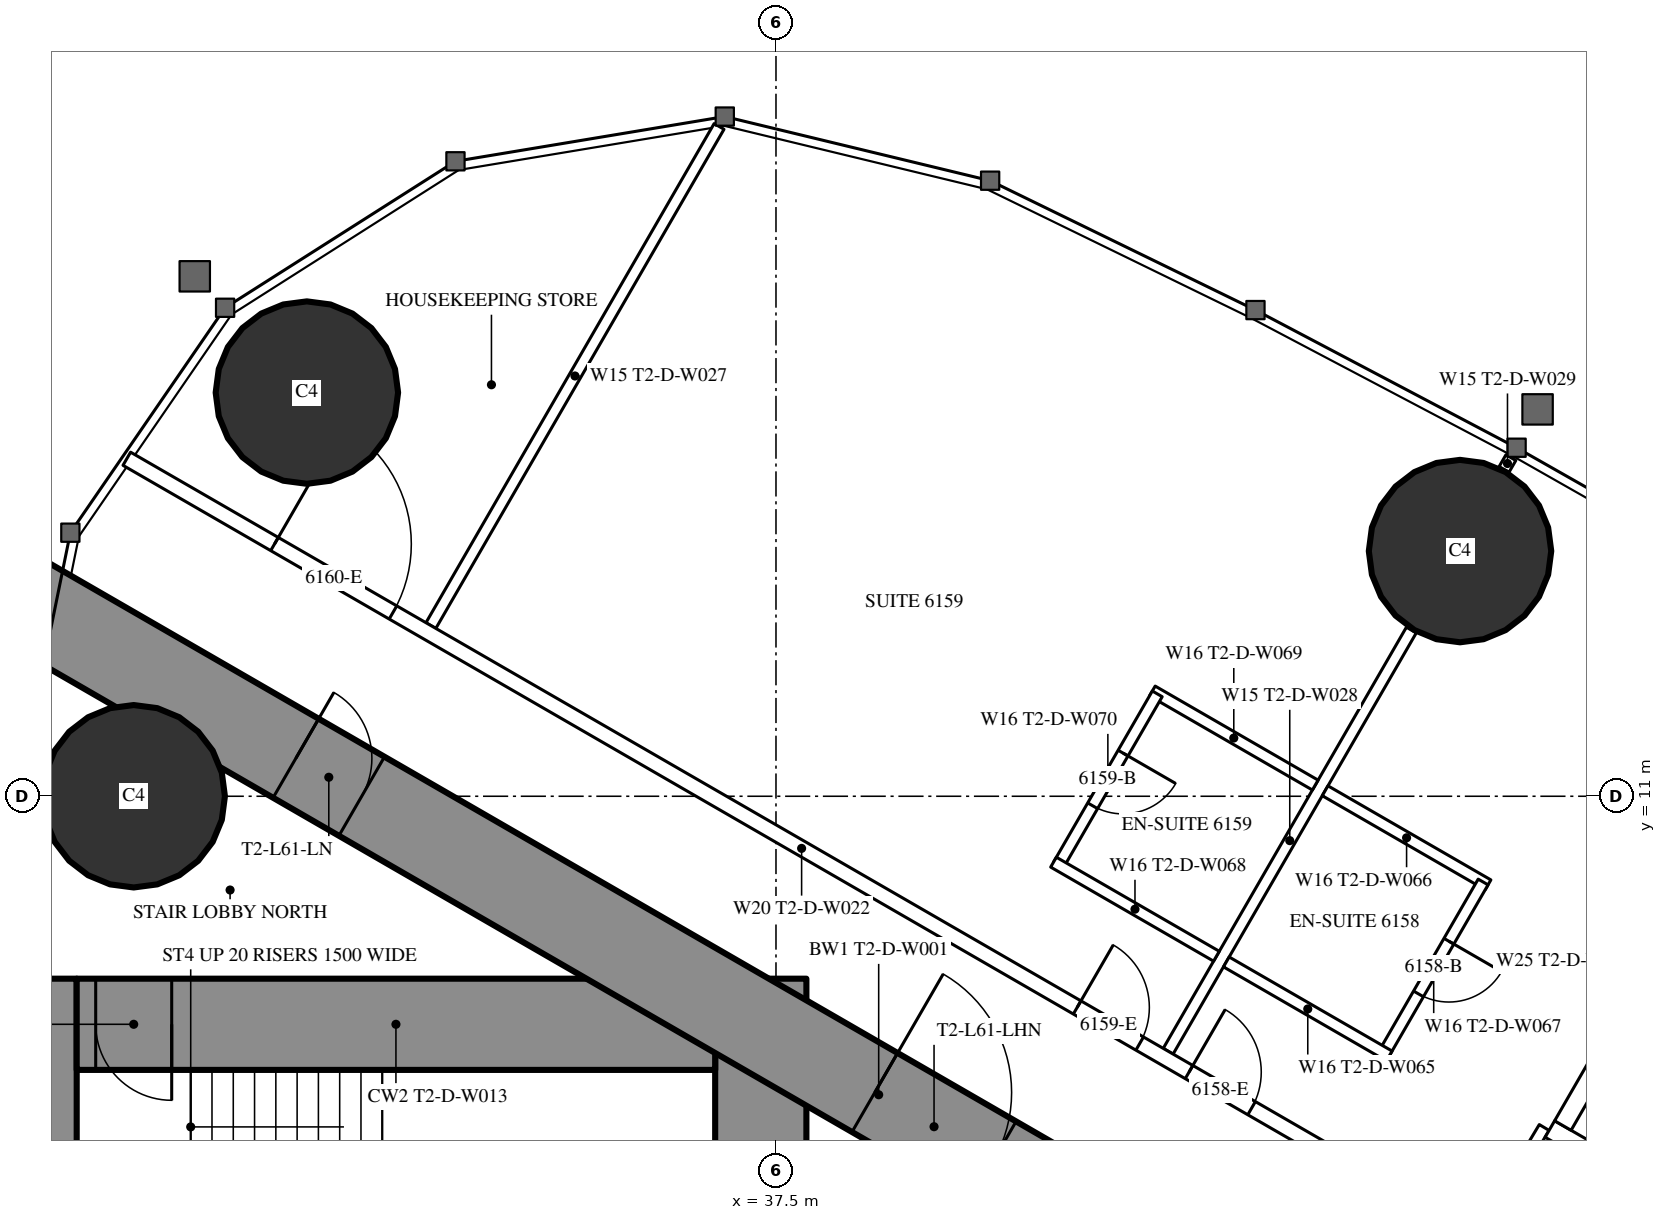
"""IFC4 building model, lengths in metres.
Left out: names, types, materials, properties, quantities, classifications, styles, units other than length and angle.
Written with IfcOpenShell. Run it as: python <this file> out.ifc"""

import sys

from ifc_helpers import new_model, si_unit, direction, frame, frame_2d, origin, origin_2d, place, context, subcontext, project, spatial, rectangle, circle, extrude, element, fill, save


model = new_model("IFC4")
c1 = context("Model", 3, precision=1e-05, world=origin(), true_north=direction((0.0, 1.0)))
c2 = subcontext(c1, "Body", "Model", "MODEL_VIEW")
j1 = project(units=[si_unit("LENGTHUNIT", "METRE"), si_unit("PLANEANGLEUNIT", "RADIAN")], contexts=[c1])
p1 = place(None, origin())
s1 = spatial("IfcSite", under=j1, at=p1, CompositionType="ELEMENT")
p2 = place(p1, origin())
s2 = spatial("IfcBuilding", under=s1, at=p2, CompositionType="ELEMENT")
p3 = place(p2, frame((0.0, 0.0, 229.7)))
s3 = spatial("IfcBuildingStorey", under=s2, at=p3, CompositionType="ELEMENT", Elevation=229.7)
for number, where, z_axis, x_axis in (
    (1, (31.328, 16.311, 0.0), (0.0, 0.0, 1.0), (1.0, 0.0, 0.0)),
    (2, (29.05, 11.0, 0.0), (0.0, 0.0, 1.0), (1.0, 0.0, 0.0)),
    (3, (46.499, 14.226, 0.0), (0.0, 0.0, 1.0), (1.0, 0.0, 0.0)),
):
    element("IfcColumn", number, at=place(p3, frame(where, z_axis=z_axis, x_axis=x_axis)), inside=s3, PredefinedType="COLUMN", context=c2, shape_type="SweptSolid", body=[
        extrude(circle(Radius=1.2, at=origin_2d()), origin(), (0.0, 0.0, 1.0), 3.6),
    ])
p4 = place(p3, frame((27.9, -8.6, 0.0), z_axis=(0.0, 0.0, 1.0), x_axis=(0.0, 1.0, 0.0)))
e4 = element("IfcWall", 4, at=p4, inside=s3, PredefinedType="SHEAR", context=c2, shape_type="SweptSolid", body=[
    extrude(rectangle(XDim=17.2, YDim=0.8, at=frame_2d((8.6, 0.0))), origin(), (0.0, 0.0, 1.0), 3.6),
])
p5 = place(p4, frame((9.35, 0.0, 0.0)))
e5 = element("IfcOpeningElement", 5, at=p5, cuts=e4, PredefinedType="OPENING", context=c2, shape_type="SweptSolid", body=[
    extrude(rectangle(XDim=0.9, YDim=2.2, at=frame_2d((0.45, 1.1))), frame((0.0, 0.41, 0.0), z_axis=(0.0, -1.0, 0.0), x_axis=(1.0, 0.0, 0.0)), (0.0, 0.0, 1.0), 0.82),
])
p6 = place(p3, frame((37.3, -8.6, 0.0), z_axis=(0.0, 0.0, 1.0), x_axis=(0.0, 1.0, 0.0)))
e6 = element("IfcWall", 6, at=p6, inside=s3, PredefinedType="SHEAR", context=c2, shape_type="SweptSolid", body=[
    extrude(rectangle(XDim=17.2, YDim=1.2, at=frame_2d((8.6, 0.0))), origin(), (0.0, 0.0, 1.0), 3.6),
])
p7 = place(p6, frame((7.7, 0.0, 0.0)))
e7 = element("IfcOpeningElement", 7, at=p7, cuts=e6, PredefinedType="OPENING", context=c2, shape_type="SweptSolid", body=[
    extrude(rectangle(XDim=1.8, YDim=2.2, at=frame_2d((0.9, 1.1))), frame((0.0, 0.61, 0.0), z_axis=(0.0, -1.0, 0.0), x_axis=(1.0, 0.0, 0.0)), (0.0, 0.0, 1.0), 1.22),
])
p8 = place(p3, frame((28.3, 8.0, 0.0), z_axis=(0.0, 0.0, 1.0), x_axis=(1.0, 0.0, 0.0)))
e8 = element("IfcWall", 8, at=p8, inside=s3, PredefinedType="SHEAR", context=c2, shape_type="SweptSolid", body=[
    extrude(rectangle(XDim=8.4, YDim=1.2, at=frame_2d((4.2, 0.0))), origin(), (0.0, 0.0, 1.0), 3.6),
])
p9 = place(p8, frame((0.25, 0.0, 0.0)))
e9 = element("IfcOpeningElement", 9, at=p9, cuts=e8, PredefinedType="OPENING", context=c2, shape_type="SweptSolid", body=[
    extrude(rectangle(XDim=1.0, YDim=2.2, at=frame_2d((0.5, 1.1))), frame((0.0, 0.61, 0.0), z_axis=(0.0, -1.0, 0.0), x_axis=(1.0, 0.0, 0.0)), (0.0, 0.0, 1.0), 1.22),
])
p10 = place(p3, frame((27.2, 13.8, 0.0), z_axis=(0.0, 0.0, 1.0), x_axis=(0.866024515034, -0.500001539357, 0.0)))
e10 = element("IfcWall", 10, at=p10, inside=s3, PredefinedType="SHEAR", context=c2, shape_type="SweptSolid", body=[
    extrude(rectangle(XDim=26.907, YDim=1.2, at=frame_2d((13.454, 0.0))), origin(), (0.0, 0.0, 1.0), 3.6),
])
p11 = place(p10, frame((4.6, 0.0, 0.0)))
e11 = element("IfcOpeningElement", 11, at=p11, cuts=e10, PredefinedType="OPENING", context=c2, shape_type="SweptSolid", body=[
    extrude(rectangle(XDim=1.0, YDim=2.2, at=frame_2d((0.5, 1.1))), frame((0.0, 0.61, 0.0), z_axis=(0.0, -1.0, 0.0), x_axis=(1.0, 0.0, 0.0)), (0.0, 0.0, 1.0), 1.22),
])
p12 = place(p10, frame((13.395, 0.0, 0.0)))
e12 = element("IfcOpeningElement", 12, at=p12, cuts=e10, PredefinedType="OPENING", context=c2, shape_type="SweptSolid", body=[
    extrude(rectangle(XDim=1.8, YDim=2.2, at=frame_2d((0.9, 1.1))), frame((0.0, 0.61, 0.0), z_axis=(0.0, -1.0, 0.0), x_axis=(1.0, 0.0, 0.0)), (0.0, 0.0, 1.0), 1.22),
])
p13 = place(p3, frame((32.96, 13.246, 0.0), z_axis=(0.0, 0.0, 1.0), x_axis=(0.500000236886, 0.866025267018, 0.0)))
e13 = element("IfcWall", 13, at=p13, inside=s3, PredefinedType="PARTITIONING", context=c2, shape_type="SweptSolid", body=[
    extrude(rectangle(XDim=7.583, YDim=0.15, at=frame_2d((3.791, 0.0))), origin(), (0.0, 0.0, 1.0), 3.35),
])
p14 = place(p3, frame((42.66, 7.646, 0.0), z_axis=(0.0, 0.0, 1.0), x_axis=(0.499996592859, 0.866027370889, 0.0)))
e14 = element("IfcWall", 14, at=p14, inside=s3, PredefinedType="PARTITIONING", context=c2, shape_type="SweptSolid", body=[
    extrude(rectangle(XDim=6.398, YDim=0.15, at=frame_2d((3.199, 0.0))), origin(), (0.0, 0.0, 1.0), 2.45),
])
p15 = place(p3, frame((47.079, 15.3, 0.0), z_axis=(0.0, 0.0, 1.0), x_axis=(0.499212083968, 0.866479829667, 0.0)))
e15 = element("IfcWall", 15, at=p15, inside=s3, PredefinedType="PARTITIONING", context=c2, shape_type="SweptSolid", body=[
    extrude(rectangle(XDim=0.179, YDim=0.15, at=frame_2d((0.09, 0.0))), origin(), (0.0, 0.0, 1.0), 2.45),
])
p16 = place(p3, frame((28.959, 15.44, 0.0), z_axis=(0.0, 0.0, 1.0), x_axis=(0.866028936079, -0.499993881836, 0.0)))
e16 = element("IfcWall", 16, at=p16, inside=s3, PredefinedType="PARTITIONING", context=c2, shape_type="SweptSolid", body=[
    extrude(rectangle(XDim=20.503, YDim=0.2, at=frame_2d((10.251, 0.0))), origin(), (0.0, 0.0, 1.0), 3.35),
])
p17 = place(p16, frame((16.137, 0.0, 0.0)))
e17 = element("IfcOpeningElement", 17, at=p17, cuts=e16, PredefinedType="OPENING", context=c2, shape_type="SweptSolid", body=[
    extrude(rectangle(XDim=0.95, YDim=2.2, at=frame_2d((0.475, 1.1))), frame((0.0, 0.11, 0.0), z_axis=(0.0, -1.0, 0.0), x_axis=(1.0, 0.0, 0.0)), (0.0, 0.0, 1.0), 0.22),
])
p18 = place(p16, frame((14.437, 0.0, 0.0)))
e18 = element("IfcOpeningElement", 18, at=p18, cuts=e16, PredefinedType="OPENING", context=c2, shape_type="SweptSolid", body=[
    extrude(rectangle(XDim=0.95, YDim=2.2, at=frame_2d((0.475, 1.1))), frame((0.0, 0.11, 0.0), z_axis=(0.0, -1.0, 0.0), x_axis=(1.0, 0.0, 0.0)), (0.0, 0.0, 1.0), 0.22),
])
p19 = place(p16, frame((2.244, 0.0, 0.0)))
e19 = element("IfcOpeningElement", 19, at=p19, cuts=e16, PredefinedType="OPENING", context=c2, shape_type="SweptSolid", body=[
    extrude(rectangle(XDim=1.8, YDim=2.04, at=frame_2d((0.9, 1.02))), frame((0.0, 0.11, 0.0), z_axis=(0.0, -1.0, 0.0), x_axis=(1.0, 0.0, 0.0)), (0.0, 0.0, 1.0), 0.22),
])
p20 = place(p3, frame((47.606, 6.642, 0.0), z_axis=(0.0, 0.0, 1.0), x_axis=(-0.51353662755, -0.858067673418, 0.0)))
e20 = element("IfcWall", 20, at=p20, inside=s3, PredefinedType="PARTITIONING", context=c2, shape_type="SweptSolid", body=[
    extrude(rectangle(XDim=1.91, YDim=0.15, at=frame_2d((0.955, 0.0))), origin(), (0.0, 0.0, 1.0), 3.35),
])
p21 = place(p3, frame((44.725, 11.072, 0.0), z_axis=(0.0, 0.0, 1.0), x_axis=(0.866006523861, -0.500032699561, 0.0)))
e21 = element("IfcWall", 21, at=p21, inside=s3, PredefinedType="PARTITIONING", context=c2, shape_type="SweptSolid", body=[
    extrude(rectangle(XDim=2.475, YDim=0.15, at=frame_2d((1.237, 0.0))), origin(), (0.0, 0.0, 1.0), 3.35),
])
p22 = place(p3, frame((45.503, 7.621, 0.0), z_axis=(0.0, 0.0, 1.0), x_axis=(0.500006934395, 0.866021400173, 0.0)))
e22 = element("IfcWall", 22, at=p22, inside=s3, PredefinedType="PARTITIONING", context=c2, shape_type="SweptSolid", body=[
    extrude(rectangle(XDim=2.6, YDim=0.15, at=frame_2d((1.3, 0.0))), origin(), (0.0, 0.0, 1.0), 3.35),
])
p23 = place(p22, frame((0.9, 0.0, 0.0)))
e23 = element("IfcOpeningElement", 23, at=p23, cuts=e22, PredefinedType="OPENING", context=c2, shape_type="SweptSolid", body=[
    extrude(rectangle(XDim=0.8, YDim=2.2, at=frame_2d((0.4, 1.1))), frame((0.0, 0.085, 0.0), z_axis=(0.0, -1.0, 0.0), x_axis=(1.0, 0.0, 0.0)), (0.0, 0.0, 1.0), 0.17),
])
p24 = place(p3, frame((43.425, 8.821, 0.0), z_axis=(0.0, 0.0, 1.0), x_axis=(0.866006523861, -0.500032699561, 0.0)))
e24 = element("IfcWall", 24, at=p24, inside=s3, PredefinedType="PARTITIONING", context=c2, shape_type="SweptSolid", body=[
    extrude(rectangle(XDim=2.475, YDim=0.15, at=frame_2d((1.237, 0.0))), origin(), (0.0, 0.0, 1.0), 2.5),
])
p25 = place(p3, frame((42.451, 12.385, 0.0), z_axis=(0.0, 0.0, 1.0), x_axis=(0.866031185235, -0.4999899861, 0.0)))
e25 = element("IfcWall", 25, at=p25, inside=s3, PredefinedType="PARTITIONING", context=c2, shape_type="SweptSolid", body=[
    extrude(rectangle(XDim=2.475, YDim=0.15, at=frame_2d((1.238, 0.0))), origin(), (0.0, 0.0, 1.0), 3.35),
])
p26 = place(p3, frame((41.216, 10.095, 0.0), z_axis=(0.0, 0.0, 1.0), x_axis=(0.499936506574, 0.866062058628, 0.0)))
e26 = element("IfcWall", 26, at=p26, inside=s3, PredefinedType="PARTITIONING", context=c2, shape_type="SweptSolid", body=[
    extrude(rectangle(XDim=2.6, YDim=0.15, at=frame_2d((1.3, 0.0))), origin(), (0.0, 0.0, 1.0), 3.35),
])
p27 = place(p26, frame((0.9, 0.0, 0.0)))
e27 = element("IfcOpeningElement", 27, at=p27, cuts=e26, PredefinedType="OPENING", context=c2, shape_type="SweptSolid", body=[
    extrude(rectangle(XDim=0.8, YDim=2.2, at=frame_2d((0.4, 1.1))), frame((0.0, 0.085, 0.0), z_axis=(0.0, -1.0, 0.0), x_axis=(1.0, 0.0, 0.0)), (0.0, 0.0, 1.0), 0.17),
])
p28 = place(p3, frame((41.151, 10.133, 0.0), z_axis=(0.0, 0.0, 1.0), x_axis=(0.866006523861, -0.500032699561, 0.0)))
e28 = element("IfcWall", 28, at=p28, inside=s3, PredefinedType="PARTITIONING", context=c2, shape_type="SweptSolid", body=[
    extrude(rectangle(XDim=2.475, YDim=0.15, at=frame_2d((1.237, 0.0))), origin(), (0.0, 0.0, 1.0), 2.5),
])
p29 = place(p3, frame((47.681, 6.622, 0.0), z_axis=(0.0, 0.0, 1.0), x_axis=(0.86603344179, -0.499986077507, 0.0)))
e29 = element("IfcWall", 29, at=p29, inside=s3, PredefinedType="PARTITIONING", context=c2, shape_type="SweptSolid", body=[
    extrude(rectangle(XDim=6.6, YDim=0.25, at=frame_2d((3.3, 0.0))), origin(), (0.0, 0.0, 1.0), 3.35),
])
p30 = place(p29, frame((0.75, 0.0, 0.0)))
e30 = element("IfcOpeningElement", 30, at=p30, cuts=e29, PredefinedType="OPENING", context=c2, shape_type="SweptSolid", body=[
    extrude(rectangle(XDim=1.1, YDim=2.2, at=frame_2d((0.55, 1.1))), frame((0.0, 0.135, 0.0), z_axis=(0.0, -1.0, 0.0), x_axis=(1.0, 0.0, 0.0)), (0.0, 0.0, 1.0), 0.27),
])
p31 = place(p29, frame((2.75, 0.0, 0.0)))
e31 = element("IfcOpeningElement", 31, at=p31, cuts=e29, PredefinedType="OPENING", context=c2, shape_type="SweptSolid", body=[
    extrude(rectangle(XDim=1.1, YDim=2.2, at=frame_2d((0.55, 1.1))), frame((0.0, 0.135, 0.0), z_axis=(0.0, -1.0, 0.0), x_axis=(1.0, 0.0, 0.0)), (0.0, 0.0, 1.0), 0.27),
])
p32 = place(p29, frame((4.75, 0.0, 0.0)))
e32 = element("IfcOpeningElement", 32, at=p32, cuts=e29, PredefinedType="OPENING", context=c2, shape_type="SweptSolid", body=[
    extrude(rectangle(XDim=1.1, YDim=2.2, at=frame_2d((0.55, 1.1))), frame((0.0, 0.135, 0.0), z_axis=(0.0, -1.0, 0.0), x_axis=(1.0, 0.0, 0.0)), (0.0, 0.0, 1.0), 0.27),
])
p33 = place(p3, frame((47.852, 6.668, 0.0), z_axis=(0.0, 0.0, 1.0), x_axis=(0.499929347863, 0.866066190972, 0.0)))
e33 = element("IfcWall", 33, at=p33, inside=s3, PredefinedType="PARTITIONING", context=c2, shape_type="SweptSolid", body=[
    extrude(rectangle(XDim=3.201, YDim=0.25, at=frame_2d((1.6, 0.0))), origin(), (0.0, 0.0, 1.0), 3.35),
])
p34 = place(p23, origin())
e34 = element("IfcDoor", 34, at=p34, inside=s3, OperationType="SINGLE_SWING_RIGHT", PredefinedType="DOOR", context=c2, shape_type="SweptSolid", body=[
    extrude(rectangle(XDim=0.8, YDim=2.2, at=frame_2d((0.4, 1.1))), frame((0.0, 0.025, 0.0), z_axis=(0.0, -1.0, 0.0), x_axis=(1.0, 0.0, 0.0)), (0.0, 0.0, 1.0), 0.05),
])
fill(e23, e34)
p35 = place(p17, origin())
e35 = element("IfcDoor", 35, at=p35, inside=s3, OperationType="SINGLE_SWING_LEFT", PredefinedType="DOOR", context=c2, shape_type="SweptSolid", body=[
    extrude(rectangle(XDim=0.95, YDim=2.2, at=frame_2d((0.475, 1.1))), frame((0.0, 0.025, 0.0), z_axis=(0.0, -1.0, 0.0), x_axis=(1.0, 0.0, 0.0)), (0.0, 0.0, 1.0), 0.05),
])
fill(e17, e35)
p36 = place(p27, origin())
e36 = element("IfcDoor", 36, at=p36, inside=s3, OperationType="SINGLE_SWING_RIGHT", PredefinedType="DOOR", context=c2, shape_type="SweptSolid", body=[
    extrude(rectangle(XDim=0.8, YDim=2.2, at=frame_2d((0.4, 1.1))), frame((0.0, 0.025, 0.0), z_axis=(0.0, -1.0, 0.0), x_axis=(1.0, 0.0, 0.0)), (0.0, 0.0, 1.0), 0.05),
])
fill(e27, e36)
p37 = place(p18, origin())
e37 = element("IfcDoor", 37, at=p37, inside=s3, OperationType="SINGLE_SWING_LEFT", PredefinedType="DOOR", context=c2, shape_type="SweptSolid", body=[
    extrude(rectangle(XDim=0.95, YDim=2.2, at=frame_2d((0.475, 1.1))), frame((0.0, 0.025, 0.0), z_axis=(0.0, -1.0, 0.0), x_axis=(1.0, 0.0, 0.0)), (0.0, 0.0, 1.0), 0.05),
])
fill(e18, e37)
p38 = place(p19, origin())
e38 = element("IfcDoor", 38, at=p38, inside=s3, OperationType="DOUBLE_DOOR_SINGLE_SWING", PredefinedType="DOOR", context=c2, shape_type="SweptSolid", body=[
    extrude(rectangle(XDim=1.8, YDim=2.04, at=frame_2d((0.9, 1.02))), frame((0.0, 0.025, 0.0), z_axis=(0.0, -1.0, 0.0), x_axis=(1.0, 0.0, 0.0)), (0.0, 0.0, 1.0), 0.05),
])
fill(e19, e38)
p39 = place(p11, origin())
e39 = element("IfcDoor", 39, at=p39, inside=s3, OperationType="SINGLE_SWING_LEFT", PredefinedType="DOOR", context=c2, shape_type="SweptSolid", body=[
    extrude(rectangle(XDim=1.0, YDim=2.2, at=frame_2d((0.5, 1.1))), frame((0.0, 0.025, 0.0), z_axis=(0.0, -1.0, 0.0), x_axis=(1.0, 0.0, 0.0)), (0.0, 0.0, 1.0), 0.05),
])
fill(e11, e39)
p40 = place(p12, origin())
e40 = element("IfcDoor", 40, at=p40, inside=s3, OperationType="DOUBLE_DOOR_SINGLE_SWING", PredefinedType="DOOR", context=c2, shape_type="SweptSolid", body=[
    extrude(rectangle(XDim=1.8, YDim=2.2, at=frame_2d((0.9, 1.1))), frame((0.0, 0.025, 0.0), z_axis=(0.0, -1.0, 0.0), x_axis=(1.0, 0.0, 0.0)), (0.0, 0.0, 1.0), 0.05),
])
fill(e12, e40)
p41 = place(p9, origin())
e41 = element("IfcDoor", 41, at=p41, inside=s3, OperationType="SINGLE_SWING_RIGHT", PredefinedType="DOOR", context=c2, shape_type="SweptSolid", body=[
    extrude(rectangle(XDim=1.0, YDim=2.2, at=frame_2d((0.5, 1.1))), frame((0.0, 0.025, 0.0), z_axis=(0.0, -1.0, 0.0), x_axis=(1.0, 0.0, 0.0)), (0.0, 0.0, 1.0), 0.05),
])
fill(e9, e41)
save(model, sys.argv[1])
